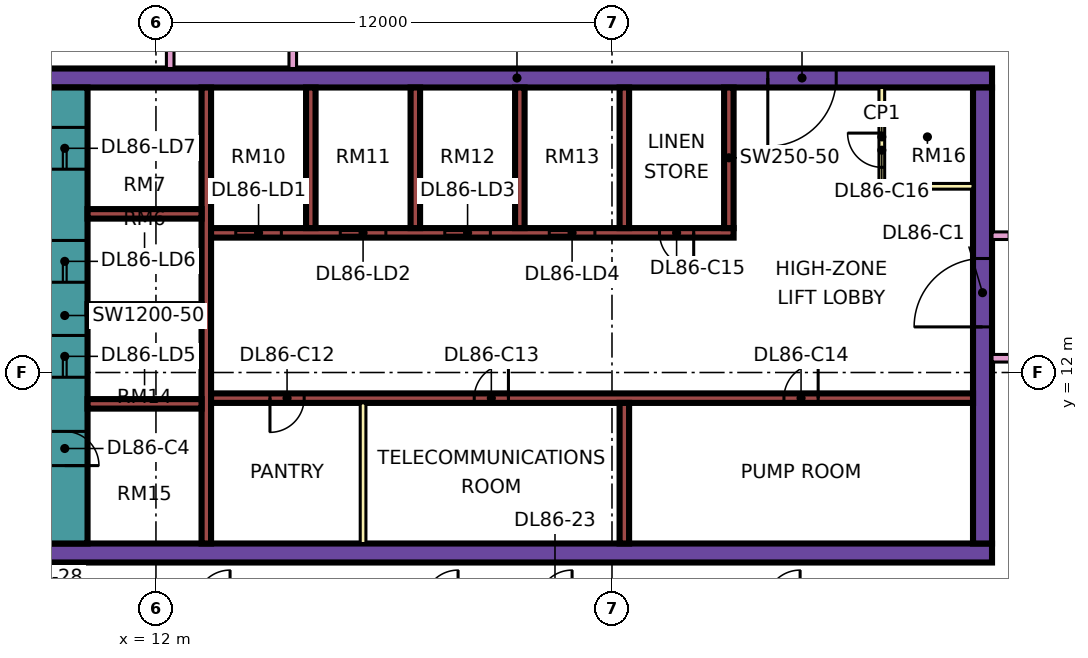
"""IFC4 building model, lengths in metres.
Left out: names, types, materials, properties, quantities, classifications, styles, units other than length and angle.
Written with IfcOpenShell. Run it as: python <this file> out.ifc"""

import sys

from ifc_helpers import new_model, si_unit, direction, frame, frame_2d, origin, place, context, subcontext, project, spatial, rectangle, extrude, element, fill, save


model = new_model("IFC4")
c1 = context("Model", 3, precision=1e-05, world=origin(), true_north=direction((0.0, 1.0)))
c2 = subcontext(c1, "Body", "Model", "MODEL_VIEW")
j1 = project(units=[si_unit("LENGTHUNIT", "METRE"), si_unit("PLANEANGLEUNIT", "RADIAN")], contexts=[c1])
p1 = place(None, origin())
s1 = spatial("IfcSite", under=j1, at=p1, CompositionType="ELEMENT")
p2 = place(p1, origin())
s2 = spatial("IfcBuilding", under=s1, at=p2, CompositionType="ELEMENT")
p3 = place(p2, frame((0.0, 0.0, 368.9)))
s3 = spatial("IfcBuildingStorey", under=s2, at=p3, CompositionType="ELEMENT", Elevation=368.9)
p4 = place(p3, frame((9.0, 7.25, 0.0), z_axis=(0.0, 0.0, 1.0), x_axis=(1.0, 0.0, 0.0)))
e1 = element("IfcWall", 1, at=p4, inside=s3, PredefinedType="SHEAR", context=c2, shape_type="SweptSolid", body=[
    extrude(rectangle(XDim=25.0, YDim=0.5, at=frame_2d((12.5, 0.0))), origin(), (0.0, 0.0, 1.0), 3.75),
])
p5 = place(p3, frame((9.0, 19.75, 0.0), z_axis=(0.0, 0.0, 1.0), x_axis=(1.0, 0.0, 0.0)))
e2 = element("IfcWall", 2, at=p5, inside=s3, PredefinedType="SHEAR", context=c2, shape_type="SweptSolid", body=[
    extrude(rectangle(XDim=25.0, YDim=0.5, at=frame_2d((12.5, 0.0))), origin(), (0.0, 0.0, 1.0), 3.75),
])
p6 = place(p5, frame((19.1, 0.0, 0.0)))
e3 = element("IfcOpeningElement", 3, at=p6, cuts=e2, PredefinedType="OPENING", context=c2, shape_type="SweptSolid", body=[
    extrude(rectangle(XDim=1.8, YDim=2.4, at=frame_2d((0.9, 1.2))), frame((0.0, 0.26, 0.0), z_axis=(0.0, -1.0, 0.0), x_axis=(1.0, 0.0, 0.0)), (0.0, 0.0, 1.0), 0.52),
])
p7 = place(p3, frame((9.6, 7.5, 0.0), z_axis=(0.0, 0.0, 1.0), x_axis=(0.0, 1.0, 0.0)))
e4 = element("IfcWall", 4, at=p7, inside=s3, PredefinedType="SHEAR", context=c2, shape_type="SweptSolid", body=[
    extrude(rectangle(XDim=12.0, YDim=1.2, at=frame_2d((6.0, 0.0))), origin(), (0.0, 0.0, 1.0), 3.75),
])
p8 = place(p7, frame((4.375, 0.0, 0.0)))
e5 = element("IfcOpeningElement", 5, at=p8, cuts=e4, PredefinedType="OPENING", context=c2, shape_type="SweptSolid", body=[
    extrude(rectangle(XDim=1.1, YDim=2.2, at=frame_2d((0.55, 1.1))), frame((0.0, 0.61, 0.0), z_axis=(0.0, -1.0, 0.0), x_axis=(1.0, 0.0, 0.0)), (0.0, 0.0, 1.0), 1.22),
])
p9 = place(p7, frame((6.875, 0.0, 0.0)))
e6 = element("IfcOpeningElement", 6, at=p9, cuts=e4, PredefinedType="OPENING", context=c2, shape_type="SweptSolid", body=[
    extrude(rectangle(XDim=1.1, YDim=2.2, at=frame_2d((0.55, 1.1))), frame((0.0, 0.61, 0.0), z_axis=(0.0, -1.0, 0.0), x_axis=(1.0, 0.0, 0.0)), (0.0, 0.0, 1.0), 1.22),
])
p10 = place(p7, frame((9.85, 0.0, 0.0)))
e7 = element("IfcOpeningElement", 7, at=p10, cuts=e4, PredefinedType="OPENING", context=c2, shape_type="SweptSolid", body=[
    extrude(rectangle(XDim=1.1, YDim=2.2, at=frame_2d((0.55, 1.1))), frame((0.0, 0.61, 0.0), z_axis=(0.0, -1.0, 0.0), x_axis=(1.0, 0.0, 0.0)), (0.0, 0.0, 1.0), 1.22),
])
p11 = place(p7, frame((2.05, 0.0, 0.0)))
e8 = element("IfcOpeningElement", 8, at=p11, cuts=e4, PredefinedType="OPENING", context=c2, shape_type="SweptSolid", body=[
    extrude(rectangle(XDim=0.9, YDim=2.1, at=frame_2d((0.45, 1.05))), frame((0.0, 0.61, 0.0), z_axis=(0.0, -1.0, 0.0), x_axis=(1.0, 0.0, 0.0)), (0.0, 0.0, 1.0), 1.22),
])
p12 = place(p3, frame((33.75, 7.5, 0.0), z_axis=(0.0, 0.0, 1.0), x_axis=(0.0, 1.0, 0.0)))
e9 = element("IfcWall", 9, at=p12, inside=s3, PredefinedType="SHEAR", context=c2, shape_type="SweptSolid", body=[
    extrude(rectangle(XDim=12.0, YDim=0.5, at=frame_2d((6.0, 0.0))), origin(), (0.0, 0.0, 1.0), 3.75),
])
p13 = place(p12, frame((5.7, 0.0, 0.0)))
e10 = element("IfcOpeningElement", 10, at=p13, cuts=e9, PredefinedType="OPENING", context=c2, shape_type="SweptSolid", body=[
    extrude(rectangle(XDim=1.8, YDim=2.4, at=frame_2d((0.9, 1.2))), frame((0.0, 0.26, 0.0), z_axis=(0.0, -1.0, 0.0), x_axis=(1.0, 0.0, 0.0)), (0.0, 0.0, 1.0), 0.52),
])
p14 = place(p3, frame((13.325, 7.5, 0.0), z_axis=(0.0, 0.0, 1.0), x_axis=(0.0, 1.0, 0.0)))
e11 = element("IfcWall", 11, at=p14, inside=s3, PredefinedType="SHEAR", context=c2, shape_type="SweptSolid", body=[
    extrude(rectangle(XDim=12.0, YDim=0.25, at=frame_2d((6.0, 0.0))), origin(), (0.0, 0.0, 1.0), 3.75),
])
p15 = place(p3, frame((13.45, 11.325, 0.0), z_axis=(0.0, 0.0, 1.0), x_axis=(1.0, 0.0, 0.0)))
e12 = element("IfcWall", 12, at=p15, inside=s3, PredefinedType="SHEAR", context=c2, shape_type="SweptSolid", body=[
    extrude(rectangle(XDim=20.05, YDim=0.25, at=frame_2d((10.025, 0.0))), origin(), (0.0, 0.0, 1.0), 3.75),
])
p16 = place(p15, frame((1.55, 0.0, 0.0)))
e13 = element("IfcOpeningElement", 13, at=p16, cuts=e12, PredefinedType="OPENING", context=c2, shape_type="SweptSolid", body=[
    extrude(rectangle(XDim=0.9, YDim=2.1, at=frame_2d((0.45, 1.05))), frame((0.0, 0.135, 0.0), z_axis=(0.0, -1.0, 0.0), x_axis=(1.0, 0.0, 0.0)), (0.0, 0.0, 1.0), 0.27),
])
p17 = place(p15, frame((6.925, 0.0, 0.0)))
e14 = element("IfcOpeningElement", 14, at=p17, cuts=e12, PredefinedType="OPENING", context=c2, shape_type="SweptSolid", body=[
    extrude(rectangle(XDim=0.9, YDim=2.1, at=frame_2d((0.45, 1.05))), frame((0.0, 0.135, 0.0), z_axis=(0.0, -1.0, 0.0), x_axis=(1.0, 0.0, 0.0)), (0.0, 0.0, 1.0), 0.27),
])
p18 = place(p15, frame((15.075, 0.0, 0.0)))
e15 = element("IfcOpeningElement", 15, at=p18, cuts=e12, PredefinedType="OPENING", context=c2, shape_type="SweptSolid", body=[
    extrude(rectangle(XDim=0.9, YDim=2.1, at=frame_2d((0.45, 1.05))), frame((0.0, 0.135, 0.0), z_axis=(0.0, -1.0, 0.0), x_axis=(1.0, 0.0, 0.0)), (0.0, 0.0, 1.0), 0.27),
])
p19 = place(p3, frame((13.45, 15.675, 0.0), z_axis=(0.0, 0.0, 1.0), x_axis=(1.0, 0.0, 0.0)))
e16 = element("IfcWall", 16, at=p19, inside=s3, PredefinedType="SHEAR", context=c2, shape_type="SweptSolid", body=[
    extrude(rectangle(XDim=13.75, YDim=0.25, at=frame_2d((6.875, 0.0))), origin(), (0.0, 0.0, 1.0), 3.75),
])
p20 = place(p19, frame((0.65, 0.0, 0.0)))
e17 = element("IfcOpeningElement", 17, at=p20, cuts=e16, PredefinedType="OPENING", context=c2, shape_type="SweptSolid", body=[
    extrude(rectangle(XDim=1.2, YDim=2.2, at=frame_2d((0.6, 1.1))), frame((0.0, 0.135, 0.0), z_axis=(0.0, -1.0, 0.0), x_axis=(1.0, 0.0, 0.0)), (0.0, 0.0, 1.0), 0.27),
])
p21 = place(p19, frame((3.4, 0.0, 0.0)))
e18 = element("IfcOpeningElement", 18, at=p21, cuts=e16, PredefinedType="OPENING", context=c2, shape_type="SweptSolid", body=[
    extrude(rectangle(XDim=1.2, YDim=2.2, at=frame_2d((0.6, 1.1))), frame((0.0, 0.135, 0.0), z_axis=(0.0, -1.0, 0.0), x_axis=(1.0, 0.0, 0.0)), (0.0, 0.0, 1.0), 0.27),
])
p22 = place(p19, frame((6.15, 0.0, 0.0)))
e19 = element("IfcOpeningElement", 19, at=p22, cuts=e16, PredefinedType="OPENING", context=c2, shape_type="SweptSolid", body=[
    extrude(rectangle(XDim=1.2, YDim=2.2, at=frame_2d((0.6, 1.1))), frame((0.0, 0.135, 0.0), z_axis=(0.0, -1.0, 0.0), x_axis=(1.0, 0.0, 0.0)), (0.0, 0.0, 1.0), 0.27),
])
p23 = place(p19, frame((8.9, 0.0, 0.0)))
e20 = element("IfcOpeningElement", 20, at=p23, cuts=e16, PredefinedType="OPENING", context=c2, shape_type="SweptSolid", body=[
    extrude(rectangle(XDim=1.2, YDim=2.2, at=frame_2d((0.6, 1.1))), frame((0.0, 0.135, 0.0), z_axis=(0.0, -1.0, 0.0), x_axis=(1.0, 0.0, 0.0)), (0.0, 0.0, 1.0), 0.27),
])
p24 = place(p19, frame((11.8, 0.0, 0.0)))
e21 = element("IfcOpeningElement", 21, at=p24, cuts=e16, PredefinedType="OPENING", context=c2, shape_type="SweptSolid", body=[
    extrude(rectangle(XDim=0.9, YDim=2.1, at=frame_2d((0.45, 1.05))), frame((0.0, 0.135, 0.0), z_axis=(0.0, -1.0, 0.0), x_axis=(1.0, 0.0, 0.0)), (0.0, 0.0, 1.0), 0.27),
])
for number, where, z_axis, x_axis in (
    (22, (10.2, 11.175, 0.0), (0.0, 0.0, 1.0), (1.0, 0.0, 0.0)),
    (23, (10.2, 13.675, 0.0), (0.0, 0.0, 1.0), (1.0, 0.0, 0.0)),
    (24, (10.2, 16.175, 0.0), (0.0, 0.0, 1.0), (1.0, 0.0, 0.0)),
):
    element("IfcWall", number, at=place(p3, frame(where, z_axis=z_axis, x_axis=x_axis)), inside=s3, PredefinedType="SHEAR", context=c2, shape_type="SweptSolid", body=[
        extrude(rectangle(XDim=3.0, YDim=0.25, at=frame_2d((1.5, 0.0))), origin(), (0.0, 0.0, 1.0), 3.75),
    ])
for number, where, z_axis, x_axis in (
    (25, (24.325, 7.5, 0.0), (0.0, 0.0, 1.0), (0.0, 1.0, 0.0)),
    (26, (16.075, 15.8, 0.0), (0.0, 0.0, 1.0), (0.0, 1.0, 0.0)),
    (27, (18.825, 15.8, 0.0), (0.0, 0.0, 1.0), (0.0, 1.0, 0.0)),
    (28, (21.575, 15.8, 0.0), (0.0, 0.0, 1.0), (0.0, 1.0, 0.0)),
    (29, (24.325, 15.8, 0.0), (0.0, 0.0, 1.0), (0.0, 1.0, 0.0)),
    (30, (27.075, 15.8, 0.0), (0.0, 0.0, 1.0), (0.0, 1.0, 0.0)),
):
    element("IfcWall", number, at=place(p3, frame(where, z_axis=z_axis, x_axis=x_axis)), inside=s3, PredefinedType="SHEAR", context=c2, shape_type="SweptSolid", body=[
        extrude(rectangle(XDim=3.7, YDim=0.25, at=frame_2d((1.85, 0.0))), origin(), (0.0, 0.0, 1.0), 3.75),
    ])
p25 = place(p3, frame((-1.447, 12.553, 0.0), z_axis=(0.0, 0.0, 1.0), x_axis=(0.707106781187, -0.707106781187, 0.0)))
e31 = element("IfcWall", 31, at=p25, inside=s3, PredefinedType="SOLIDWALL", context=c2, shape_type="SweptSolid", body=[
    extrude(rectangle(XDim=19.799, YDim=0.15, at=frame_2d((9.899, 0.0))), origin(), (0.0, 0.0, 1.0), 3.35),
])
p26 = place(p25, frame((2.212, 0.0, 0.45)))
e32 = element("IfcOpeningElement", 32, at=p26, cuts=e31, PredefinedType="OPENING", context=c2, shape_type="SweptSolid", body=[
    extrude(rectangle(XDim=3.0, YDim=2.4, at=frame_2d((1.5, 1.2))), frame((0.0, 0.085, 0.0), z_axis=(0.0, -1.0, 0.0), x_axis=(1.0, 0.0, 0.0)), (0.0, 0.0, 1.0), 0.17),
])
p27 = place(p25, frame((10.216, 0.0, 0.45)))
e33 = element("IfcOpeningElement", 33, at=p27, cuts=e31, PredefinedType="OPENING", context=c2, shape_type="SweptSolid", body=[
    extrude(rectangle(XDim=3.0, YDim=2.4, at=frame_2d((1.5, 1.2))), frame((0.0, 0.085, 0.0), z_axis=(0.0, -1.0, 0.0), x_axis=(1.0, 0.0, 0.0)), (0.0, 0.0, 1.0), 0.17),
])
p28 = place(p3, frame((17.45, 7.5, 0.0), z_axis=(0.0, 0.0, 1.0), x_axis=(0.0, 1.0, 0.0)))
e34 = element("IfcWall", 34, at=p28, inside=s3, PredefinedType="PARTITIONING", context=c2, shape_type="SweptSolid", body=[
    extrude(rectangle(XDim=3.7, YDim=0.15, at=frame_2d((1.85, 0.0))), origin(), (0.0, 0.0, 1.0), 3.35),
])
p29 = place(p3, frame((31.1, 16.9, 0.0), z_axis=(0.0, 0.0, 1.0), x_axis=(0.0, 1.0, 0.0)))
e35 = element("IfcWall", 35, at=p29, inside=s3, PredefinedType="PARTITIONING", context=c2, shape_type="SweptSolid", body=[
    extrude(rectangle(XDim=2.6, YDim=0.15, at=frame_2d((1.3, 0.0))), origin(), (0.0, 0.0, 1.0), 3.35),
])
p30 = place(p29, frame((0.5, 0.0, 0.0)))
e36 = element("IfcOpeningElement", 36, at=p30, cuts=e35, PredefinedType="OPENING", context=c2, shape_type="SweptSolid", body=[
    extrude(rectangle(XDim=0.9, YDim=2.1, at=frame_2d((0.45, 1.05))), frame((0.0, 0.085, 0.0), z_axis=(0.0, -1.0, 0.0), x_axis=(1.0, 0.0, 0.0)), (0.0, 0.0, 1.0), 0.17),
])
p31 = place(p3, frame((31.1, 16.9, 0.0), z_axis=(0.0, 0.0, 1.0), x_axis=(1.0, 0.0, 0.0)))
e37 = element("IfcWall", 37, at=p31, inside=s3, PredefinedType="PARTITIONING", context=c2, shape_type="SweptSolid", body=[
    extrude(rectangle(XDim=2.4, YDim=0.15, at=frame_2d((1.2, 0.0))), origin(), (0.0, 0.0, 1.0), 3.35),
])
p32 = place(p3, frame((12.375, 20.0, 0.0), z_axis=(0.0, 0.0, 1.0), x_axis=(0.0, 1.0, 0.0)))
e38 = element("IfcWall", 38, at=p32, inside=s3, PredefinedType="PARTITIONING", context=c2, shape_type="SweptSolid", body=[
    extrude(rectangle(XDim=34.0, YDim=0.2, at=frame_2d((17.0, 0.0))), origin(), (0.0, 0.0, 1.0), 3.35),
])
p33 = place(p32, frame((16.8, 0.0, 0.0)))
e39 = element("IfcOpeningElement", 39, at=p33, cuts=e38, PredefinedType="OPENING", context=c2, shape_type="SweptSolid", body=[
    extrude(rectangle(XDim=1.0, YDim=2.1, at=frame_2d((0.5, 1.05))), frame((0.0, 0.11, 0.0), z_axis=(0.0, -1.0, 0.0), x_axis=(1.0, 0.0, 0.0)), (0.0, 0.0, 1.0), 0.22),
])
p34 = place(p32, frame((0.6, 0.0, 0.0)))
e40 = element("IfcOpeningElement", 40, at=p34, cuts=e38, PredefinedType="OPENING", context=c2, shape_type="SweptSolid", body=[
    extrude(rectangle(XDim=1.2, YDim=2.1, at=frame_2d((0.6, 1.05))), frame((0.0, 0.11, 0.0), z_axis=(0.0, -1.0, 0.0), x_axis=(1.0, 0.0, 0.0)), (0.0, 0.0, 1.0), 0.22),
])
p35 = place(p32, frame((4.5, 0.0, 0.0)))
e41 = element("IfcOpeningElement", 41, at=p35, cuts=e38, PredefinedType="OPENING", context=c2, shape_type="SweptSolid", body=[
    extrude(rectangle(XDim=1.0, YDim=2.1, at=frame_2d((0.5, 1.05))), frame((0.0, 0.11, 0.0), z_axis=(0.0, -1.0, 0.0), x_axis=(1.0, 0.0, 0.0)), (0.0, 0.0, 1.0), 0.22),
])
p36 = place(p3, frame((15.6, 20.0, 0.0), z_axis=(0.0, 0.0, 1.0), x_axis=(0.0, 1.0, 0.0)))
e42 = element("IfcWall", 42, at=p36, inside=s3, PredefinedType="PARTITIONING", context=c2, shape_type="SweptSolid", body=[
    extrude(rectangle(XDim=27.775, YDim=0.2, at=frame_2d((13.887, 0.0))), origin(), (0.0, 0.0, 1.0), 3.35),
])
p37 = place(p36, frame((7.15, 0.0, 0.0)))
e43 = element("IfcOpeningElement", 43, at=p37, cuts=e42, PredefinedType="OPENING", context=c2, shape_type="SweptSolid", body=[
    extrude(rectangle(XDim=1.6, YDim=2.1, at=frame_2d((0.8, 1.05))), frame((0.0, 0.11, 0.0), z_axis=(0.0, -1.0, 0.0), x_axis=(1.0, 0.0, 0.0)), (0.0, 0.0, 1.0), 0.22),
])
p38 = place(p36, frame((13.5, 0.0, 0.0)))
e44 = element("IfcOpeningElement", 44, at=p38, cuts=e42, PredefinedType="OPENING", context=c2, shape_type="SweptSolid", body=[
    extrude(rectangle(XDim=1.0, YDim=2.1, at=frame_2d((0.5, 1.05))), frame((0.0, 0.11, 0.0), z_axis=(0.0, -1.0, 0.0), x_axis=(1.0, 0.0, 0.0)), (0.0, 0.0, 1.0), 0.22),
])
p39 = place(p36, frame((23.35, 0.0, 0.0)))
e45 = element("IfcOpeningElement", 45, at=p39, cuts=e42, PredefinedType="OPENING", context=c2, shape_type="SweptSolid", body=[
    extrude(rectangle(XDim=1.0, YDim=2.1, at=frame_2d((0.5, 1.05))), frame((0.0, 0.11, 0.0), z_axis=(0.0, -1.0, 0.0), x_axis=(1.0, 0.0, 0.0)), (0.0, 0.0, 1.0), 0.22),
])
p40 = place(p36, frame((1.15, 0.0, 0.0)))
e46 = element("IfcOpeningElement", 46, at=p40, cuts=e42, PredefinedType="OPENING", context=c2, shape_type="SweptSolid", body=[
    extrude(rectangle(XDim=1.8, YDim=2.1, at=frame_2d((0.9, 1.05))), frame((0.0, 0.11, 0.0), z_axis=(0.0, -1.0, 0.0), x_axis=(1.0, 0.0, 0.0)), (0.0, 0.0, 1.0), 0.22),
])
p41 = place(p36, frame((25.9, 0.0, 0.0)))
e47 = element("IfcOpeningElement", 47, at=p41, cuts=e42, PredefinedType="OPENING", context=c2, shape_type="SweptSolid", body=[
    extrude(rectangle(XDim=1.0, YDim=2.1, at=frame_2d((0.5, 1.05))), frame((0.0, 0.11, 0.0), z_axis=(0.0, -1.0, 0.0), x_axis=(1.0, 0.0, 0.0)), (0.0, 0.0, 1.0), 0.22),
])
p42 = place(p3, frame((34.0, 12.375, 0.0), z_axis=(0.0, 0.0, 1.0), x_axis=(1.0, 0.0, 0.0)))
e48 = element("IfcWall", 48, at=p42, inside=s3, PredefinedType="PARTITIONING", context=c2, shape_type="SweptSolid", body=[
    extrude(rectangle(XDim=2.376, YDim=0.2, at=frame_2d((1.188, 0.0))), origin(), (0.0, 0.0, 1.0), 3.35),
])
p43 = place(p3, frame((34.0, 15.6, 0.0), z_axis=(0.0, 0.0, 1.0), x_axis=(1.0, 0.0, 0.0)))
e49 = element("IfcWall", 49, at=p43, inside=s3, PredefinedType="PARTITIONING", context=c2, shape_type="SweptSolid", body=[
    extrude(rectangle(XDim=10.35, YDim=0.2, at=frame_2d((5.175, 0.0))), origin(), (0.0, 0.0, 1.0), 3.35),
])
p44 = place(p43, frame((5.6, 0.0, 0.0)))
e50 = element("IfcOpeningElement", 50, at=p44, cuts=e49, PredefinedType="OPENING", context=c2, shape_type="SweptSolid", body=[
    extrude(rectangle(XDim=1.0, YDim=2.1, at=frame_2d((0.5, 1.05))), frame((0.0, 0.11, 0.0), z_axis=(0.0, -1.0, 0.0), x_axis=(1.0, 0.0, 0.0)), (0.0, 0.0, 1.0), 0.22),
])
p45 = place(p43, frame((0.45, 0.0, 0.0)))
e51 = element("IfcOpeningElement", 51, at=p45, cuts=e49, PredefinedType="OPENING", context=c2, shape_type="SweptSolid", body=[
    extrude(rectangle(XDim=1.2, YDim=2.1, at=frame_2d((0.6, 1.05))), frame((0.0, 0.11, 0.0), z_axis=(0.0, -1.0, 0.0), x_axis=(1.0, 0.0, 0.0)), (0.0, 0.0, 1.0), 0.22),
])
p46 = place(p20, origin())
e52 = element("IfcDoor", 52, at=p46, inside=s3, OperationType="DOUBLE_DOOR_SLIDING", PredefinedType="DOOR", context=c2, shape_type="SweptSolid", body=[
    extrude(rectangle(XDim=1.2, YDim=2.2, at=frame_2d((0.6, 1.1))), frame((0.0, 0.025, 0.0), z_axis=(0.0, -1.0, 0.0), x_axis=(1.0, 0.0, 0.0)), (0.0, 0.0, 1.0), 0.05),
])
fill(e17, e52)
p47 = place(p21, origin())
e53 = element("IfcDoor", 53, at=p47, inside=s3, OperationType="DOUBLE_DOOR_SLIDING", PredefinedType="DOOR", context=c2, shape_type="SweptSolid", body=[
    extrude(rectangle(XDim=1.2, YDim=2.2, at=frame_2d((0.6, 1.1))), frame((0.0, 0.025, 0.0), z_axis=(0.0, -1.0, 0.0), x_axis=(1.0, 0.0, 0.0)), (0.0, 0.0, 1.0), 0.05),
])
fill(e18, e53)
p48 = place(p22, origin())
e54 = element("IfcDoor", 54, at=p48, inside=s3, OperationType="DOUBLE_DOOR_SLIDING", PredefinedType="DOOR", context=c2, shape_type="SweptSolid", body=[
    extrude(rectangle(XDim=1.2, YDim=2.2, at=frame_2d((0.6, 1.1))), frame((0.0, 0.025, 0.0), z_axis=(0.0, -1.0, 0.0), x_axis=(1.0, 0.0, 0.0)), (0.0, 0.0, 1.0), 0.05),
])
fill(e19, e54)
p49 = place(p23, origin())
e55 = element("IfcDoor", 55, at=p49, inside=s3, OperationType="DOUBLE_DOOR_SLIDING", PredefinedType="DOOR", context=c2, shape_type="SweptSolid", body=[
    extrude(rectangle(XDim=1.2, YDim=2.2, at=frame_2d((0.6, 1.1))), frame((0.0, 0.025, 0.0), z_axis=(0.0, -1.0, 0.0), x_axis=(1.0, 0.0, 0.0)), (0.0, 0.0, 1.0), 0.05),
])
fill(e20, e55)
p50 = place(p8, origin())
e56 = element("IfcDoor", 56, at=p50, inside=s3, OperationType="DOUBLE_DOOR_SLIDING", PredefinedType="DOOR", context=c2, shape_type="SweptSolid", body=[
    extrude(rectangle(XDim=1.1, YDim=2.2, at=frame_2d((0.55, 1.1))), frame((0.0, 0.025, 0.0), z_axis=(0.0, -1.0, 0.0), x_axis=(1.0, 0.0, 0.0)), (0.0, 0.0, 1.0), 0.05),
])
fill(e5, e56)
p51 = place(p9, origin())
e57 = element("IfcDoor", 57, at=p51, inside=s3, OperationType="DOUBLE_DOOR_SLIDING", PredefinedType="DOOR", context=c2, shape_type="SweptSolid", body=[
    extrude(rectangle(XDim=1.1, YDim=2.2, at=frame_2d((0.55, 1.1))), frame((0.0, 0.025, 0.0), z_axis=(0.0, -1.0, 0.0), x_axis=(1.0, 0.0, 0.0)), (0.0, 0.0, 1.0), 0.05),
])
fill(e6, e57)
p52 = place(p10, origin())
e58 = element("IfcDoor", 58, at=p52, inside=s3, OperationType="DOUBLE_DOOR_SLIDING", PredefinedType="DOOR", context=c2, shape_type="SweptSolid", body=[
    extrude(rectangle(XDim=1.1, YDim=2.2, at=frame_2d((0.55, 1.1))), frame((0.0, 0.025, 0.0), z_axis=(0.0, -1.0, 0.0), x_axis=(1.0, 0.0, 0.0)), (0.0, 0.0, 1.0), 0.05),
])
fill(e7, e58)
p53 = place(p13, origin())
e59 = element("IfcDoor", 59, at=p53, inside=s3, OperationType="DOUBLE_DOOR_SINGLE_SWING", PredefinedType="DOOR", context=c2, shape_type="SweptSolid", body=[
    extrude(rectangle(XDim=1.8, YDim=2.4, at=frame_2d((0.9, 1.2))), frame((0.0, 0.025, 0.0), z_axis=(0.0, -1.0, 0.0), x_axis=(1.0, 0.0, 0.0)), (0.0, 0.0, 1.0), 0.05),
])
fill(e10, e59)
p54 = place(p6, frame((1.8, 0.0, 0.0), z_axis=(0.0, 0.0, 1.0), x_axis=(-1.0, 0.0, 0.0)))
e60 = element("IfcDoor", 60, at=p54, inside=s3, OperationType="DOUBLE_DOOR_SINGLE_SWING", PredefinedType="DOOR", context=c2, shape_type="SweptSolid", body=[
    extrude(rectangle(XDim=1.8, YDim=2.4, at=frame_2d((0.9, 1.2))), frame((0.0, 0.025, 0.0), z_axis=(0.0, -1.0, 0.0), x_axis=(1.0, 0.0, 0.0)), (0.0, 0.0, 1.0), 0.05),
])
fill(e3, e60)
p55 = place(p11, frame((0.9, 0.0, 0.0), z_axis=(0.0, 0.0, 1.0), x_axis=(-1.0, 0.0, 0.0)))
e61 = element("IfcDoor", 61, at=p55, inside=s3, OperationType="SINGLE_SWING_LEFT", PredefinedType="DOOR", context=c2, shape_type="SweptSolid", body=[
    extrude(rectangle(XDim=0.9, YDim=2.1, at=frame_2d((0.45, 1.05))), frame((0.0, 0.025, 0.0), z_axis=(0.0, -1.0, 0.0), x_axis=(1.0, 0.0, 0.0)), (0.0, 0.0, 1.0), 0.05),
])
fill(e8, e61)
p56 = place(p16, frame((0.9, 0.0, 0.0), z_axis=(0.0, 0.0, 1.0), x_axis=(-1.0, 0.0, 0.0)))
e62 = element("IfcDoor", 62, at=p56, inside=s3, OperationType="SINGLE_SWING_LEFT", PredefinedType="DOOR", context=c2, shape_type="SweptSolid", body=[
    extrude(rectangle(XDim=0.9, YDim=2.1, at=frame_2d((0.45, 1.05))), frame((0.0, 0.025, 0.0), z_axis=(0.0, -1.0, 0.0), x_axis=(1.0, 0.0, 0.0)), (0.0, 0.0, 1.0), 0.05),
])
fill(e13, e62)
p57 = place(p17, frame((0.9, 0.0, 0.0), z_axis=(0.0, 0.0, 1.0), x_axis=(-1.0, 0.0, 0.0)))
e63 = element("IfcDoor", 63, at=p57, inside=s3, OperationType="SINGLE_SWING_RIGHT", PredefinedType="DOOR", context=c2, shape_type="SweptSolid", body=[
    extrude(rectangle(XDim=0.9, YDim=2.1, at=frame_2d((0.45, 1.05))), frame((0.0, 0.025, 0.0), z_axis=(0.0, -1.0, 0.0), x_axis=(1.0, 0.0, 0.0)), (0.0, 0.0, 1.0), 0.05),
])
fill(e14, e63)
p58 = place(p18, frame((0.9, 0.0, 0.0), z_axis=(0.0, 0.0, 1.0), x_axis=(-1.0, 0.0, 0.0)))
e64 = element("IfcDoor", 64, at=p58, inside=s3, OperationType="SINGLE_SWING_RIGHT", PredefinedType="DOOR", context=c2, shape_type="SweptSolid", body=[
    extrude(rectangle(XDim=0.9, YDim=2.1, at=frame_2d((0.45, 1.05))), frame((0.0, 0.025, 0.0), z_axis=(0.0, -1.0, 0.0), x_axis=(1.0, 0.0, 0.0)), (0.0, 0.0, 1.0), 0.05),
])
fill(e15, e64)
p59 = place(p24, origin())
e65 = element("IfcDoor", 65, at=p59, inside=s3, OperationType="SINGLE_SWING_RIGHT", PredefinedType="DOOR", context=c2, shape_type="SweptSolid", body=[
    extrude(rectangle(XDim=0.9, YDim=2.1, at=frame_2d((0.45, 1.05))), frame((0.0, 0.025, 0.0), z_axis=(0.0, -1.0, 0.0), x_axis=(1.0, 0.0, 0.0)), (0.0, 0.0, 1.0), 0.05),
])
fill(e21, e65)
p60 = place(p30, frame((0.9, 0.0, 0.0), z_axis=(0.0, 0.0, 1.0), x_axis=(-1.0, 0.0, 0.0)))
e66 = element("IfcDoor", 66, at=p60, inside=s3, OperationType="SINGLE_SWING_RIGHT", PredefinedType="DOOR", context=c2, shape_type="SweptSolid", body=[
    extrude(rectangle(XDim=0.9, YDim=2.1, at=frame_2d((0.45, 1.05))), frame((0.0, 0.025, 0.0), z_axis=(0.0, -1.0, 0.0), x_axis=(1.0, 0.0, 0.0)), (0.0, 0.0, 1.0), 0.05),
])
fill(e36, e66)
save(model, sys.argv[1])
